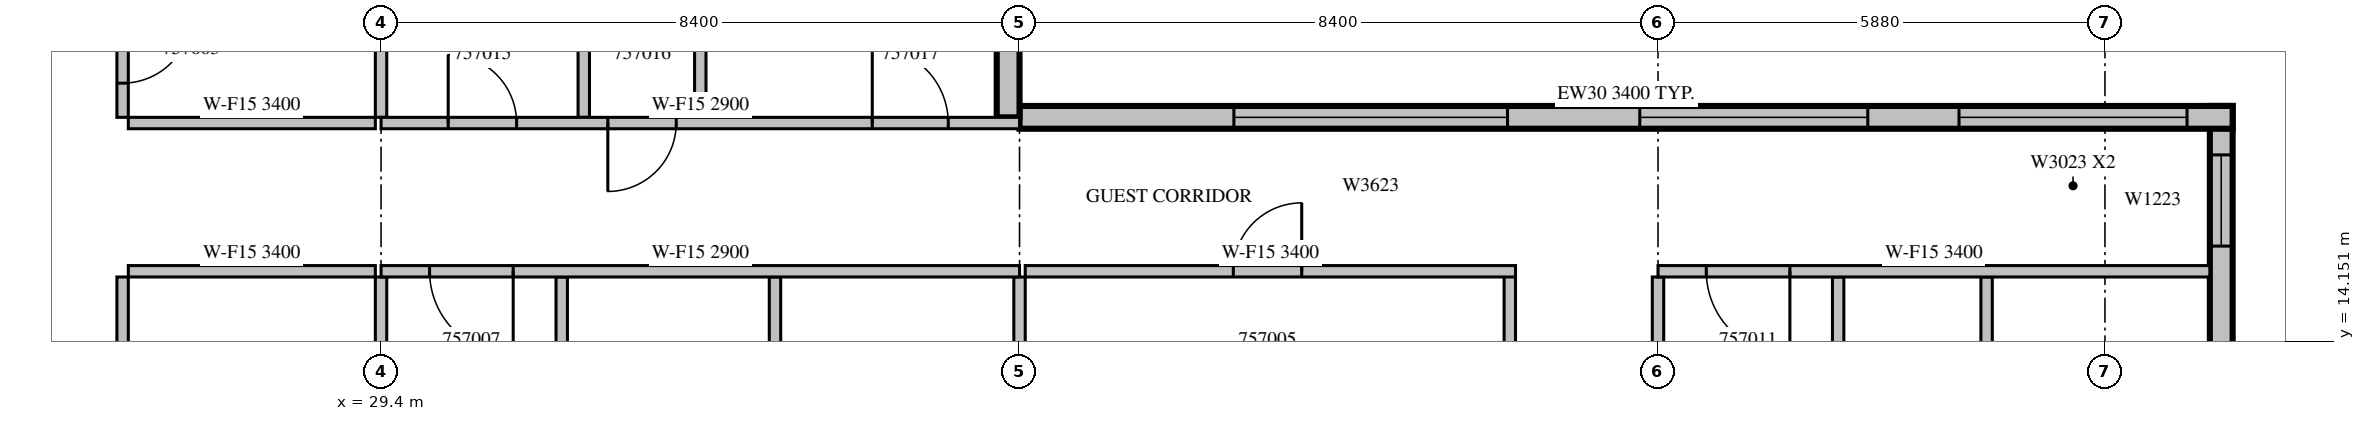
"""IFC4 building model, lengths in metres.
Left out: names, types, materials, properties, quantities, classifications, styles, units other than length and angle.
Written with IfcOpenShell. Run it as: python <this file> out.ifc"""

import sys

from ifc_helpers import new_model, si_unit, direction, frame, frame_2d, origin, place, context, subcontext, project, spatial, rectangle, extrude, source, transform, mapped, element, fill, save


model = new_model("IFC4")
c1 = context("Model", 3, precision=1e-05, world=origin(), true_north=direction((0.0, 1.0)))
c2 = subcontext(c1, "Body", "Model", "MODEL_VIEW")
j1 = project(units=[si_unit("LENGTHUNIT", "METRE"), si_unit("PLANEANGLEUNIT", "RADIAN")], contexts=[c1])
p1 = place(None, origin())
s1 = spatial("IfcSite", under=j1, at=p1, CompositionType="ELEMENT")
p2 = place(p1, origin())
s2 = spatial("IfcBuilding", under=s1, at=p2, CompositionType="ELEMENT")
p3 = place(p2, frame((0.0, 0.0, 250.0)))
s3 = spatial("IfcBuildingStorey", under=s2, at=p3, CompositionType="ELEMENT", Elevation=250.0)
m1 = source(origin(), c2, "Body", "SweptSolid", [
    extrude(rectangle(XDim=3.375, YDim=0.3, at=frame_2d((1.688, 0.0))), origin(), (0.0, 0.0, 1.0), 3.4),
])
p4 = place(p3, frame((53.61, 13.875, 0.0), z_axis=(0.0, 0.0, 1.0), x_axis=(0.0, 1.0, 0.0)))
e1 = element("IfcWall", 1, at=p4, inside=s3, PredefinedType="STANDARD", context=c2, shape_type="MappedRepresentation", body=[
    mapped(m1, transform((0.0, 0.0, 0.0), scale=1.0)),
])
m2 = source(origin(), c2, "Body", "SweptSolid", [
    extrude(rectangle(XDim=1.2, YDim=2.3, at=frame_2d((0.6, 1.15))), frame((0.0, 0.16, 0.0), z_axis=(0.0, -1.0, 0.0), x_axis=(1.0, 0.0, 0.0)), (0.0, 0.0, 1.0), 0.32),
])
p5 = place(p4, frame((1.531, 0.0, 0.6)))
e2 = element("IfcOpeningElement", 2, at=p5, cuts=e1, PredefinedType="OPENING", context=c2, shape_type="MappedRepresentation", body=[
    mapped(m2, transform((0.0, 0.0, 0.0), scale=1.0)),
])
m3 = source(origin(), c2, "Body", "SweptSolid", [
    extrude(rectangle(XDim=15.96, YDim=0.3, at=frame_2d((7.98, 0.0))), origin(), (0.0, 0.0, 1.0), 3.4),
])
p6 = place(p3, frame((53.76, 17.1, 0.0), z_axis=(0.0, 0.0, 1.0), x_axis=(-1.0, 0.0, 0.0)))
e3 = element("IfcWall", 3, at=p6, inside=s3, PredefinedType="STANDARD", context=c2, shape_type="MappedRepresentation", body=[
    mapped(m3, transform((0.0, 0.0, 0.0), scale=1.0)),
])
m4 = source(origin(), c2, "Body", "SweptSolid", [
    extrude(rectangle(XDim=3.0, YDim=2.3, at=frame_2d((1.5, 1.15))), frame((0.0, 0.16, 0.0), z_axis=(0.0, -1.0, 0.0), x_axis=(1.0, 0.0, 0.0)), (0.0, 0.0, 1.0), 0.32),
])
p7 = place(p6, frame((0.6, 0.0, 0.6)))
e4 = element("IfcOpeningElement", 4, at=p7, cuts=e3, PredefinedType="OPENING", context=c2, shape_type="MappedRepresentation", body=[
    mapped(m4, transform((0.0, 0.0, 0.0), scale=1.0)),
])
p8 = place(p6, frame((4.8, 0.0, 0.6)))
e5 = element("IfcOpeningElement", 5, at=p8, cuts=e3, PredefinedType="OPENING", context=c2, shape_type="MappedRepresentation", body=[
    mapped(m4, transform((0.0, 0.0, 0.0), scale=1.0)),
])
m5 = source(origin(), c2, "Body", "SweptSolid", [
    extrude(rectangle(XDim=3.6, YDim=2.3, at=frame_2d((1.8, 1.15))), frame((0.0, 0.16, 0.0), z_axis=(0.0, -1.0, 0.0), x_axis=(1.0, 0.0, 0.0)), (0.0, 0.0, 1.0), 0.32),
])
p9 = place(p6, frame((9.54, 0.0, 0.6)))
e6 = element("IfcOpeningElement", 6, at=p9, cuts=e3, PredefinedType="OPENING", context=c2, shape_type="MappedRepresentation", body=[
    mapped(m5, transform((0.0, 0.0, 0.0), scale=1.0)),
])
m6 = source(origin(), c2, "Body", "SweptSolid", [
    extrude(rectangle(XDim=3.1, YDim=0.3, at=frame_2d((1.55, 0.0))), origin(), (0.0, 0.0, 1.0), 3.4),
])
p10 = place(p3, frame((37.65, 17.1, 0.0), z_axis=(0.0, 0.0, 1.0), x_axis=(0.0, 1.0, 0.0)))
e7 = element("IfcWall", 7, at=p10, inside=s3, PredefinedType="STANDARD", context=c2, shape_type="MappedRepresentation", body=[
    mapped(m6, transform((0.0, 0.0, 0.0), scale=1.0)),
])
m7 = source(origin(), c2, "Body", "SweptSolid", [
    extrude(rectangle(XDim=1.8, YDim=2.3, at=frame_2d((0.9, 1.15))), frame((0.0, 0.16, 0.0), z_axis=(0.0, -1.0, 0.0), x_axis=(1.0, 0.0, 0.0)), (0.0, 0.0, 1.0), 0.32),
])
p11 = place(p10, frame((1.125, 0.0, 0.6)))
e8 = element("IfcOpeningElement", 8, at=p11, cuts=e7, PredefinedType="OPENING", context=c2, shape_type="MappedRepresentation", body=[
    mapped(m7, transform((0.0, 0.0, 0.0), scale=1.0)),
])
m8 = source(origin(), c2, "Body", "SweptSolid", [
    extrude(rectangle(XDim=11.525, YDim=0.15, at=frame_2d((5.763, 0.0))), origin(), (0.0, 0.0, 1.0), 2.4),
])
p12 = place(p3, frame((26.0, 15.0, 0.0), z_axis=(0.0, 0.0, 1.0), x_axis=(0.0, -1.0, 0.0)))
e9 = element("IfcWall", 9, at=p12, inside=s3, PredefinedType="PARTITIONING", context=c2, shape_type="MappedRepresentation", body=[
    mapped(m8, transform((0.0, 0.0, 0.0), scale=1.0)),
])
m9 = source(origin(), c2, "Body", "SweptSolid", [
    extrude(rectangle(XDim=0.9, YDim=2.1, at=frame_2d((0.45, 1.05))), frame((0.0, 0.085, 0.0), z_axis=(0.0, -1.0, 0.0), x_axis=(1.0, 0.0, 0.0)), (0.0, 0.0, 1.0), 0.17),
])
p13 = place(p12, frame((8.162, 0.0, 0.0)))
e10 = element("IfcOpeningElement", 10, at=p13, cuts=e9, PredefinedType="OPENING", context=c2, shape_type="MappedRepresentation", body=[
    mapped(m9, transform((0.0, 0.0, 0.0), scale=1.0)),
])
p14 = place(p12, frame((1.525, 0.0, 0.0)))
e11 = element("IfcOpeningElement", 11, at=p14, cuts=e9, PredefinedType="OPENING", context=c2, shape_type="MappedRepresentation", body=[
    mapped(m9, transform((0.0, 0.0, 0.0), scale=1.0)),
])
m10 = source(origin(), c2, "Body", "SweptSolid", [
    extrude(rectangle(XDim=3.6, YDim=0.15, at=frame_2d((1.8, 0.0))), origin(), (0.0, 0.0, 1.0), 3.4),
])
p15 = place(p3, frame((26.0, 20.7, 0.0), z_axis=(0.0, 0.0, 1.0), x_axis=(0.0, -1.0, 0.0)))
e12 = element("IfcWall", 12, at=p15, inside=s3, PredefinedType="PARTITIONING", context=c2, shape_type="MappedRepresentation", body=[
    mapped(m10, transform((0.0, 0.0, 0.0), scale=1.0)),
])
p16 = place(p15, frame((2.25, 0.0, 0.0)))
e13 = element("IfcOpeningElement", 13, at=p16, cuts=e12, PredefinedType="OPENING", context=c2, shape_type="MappedRepresentation", body=[
    mapped(m9, transform((0.0, 0.0, 0.0), scale=1.0)),
])
m11 = source(origin(), c2, "Body", "SweptSolid", [
    extrude(rectangle(XDim=3.25, YDim=0.15, at=frame_2d((1.625, 0.0))), origin(), (0.0, 0.0, 1.0), 3.4),
])
for number, where, z_axis, x_axis in (
    (14, (29.325, 15.075, 0.0), (0.0, 0.0, 1.0), (-1.0, 0.0, 0.0)),
    (15, (26.075, 17.025, 0.0), (0.0, 0.0, 1.0), (1.0, 0.0, 0.0)),
):
    element("IfcWall", number, at=place(p3, frame(where, z_axis=z_axis, x_axis=x_axis)), inside=s3, PredefinedType="PARTITIONING", context=c2, shape_type="MappedRepresentation", body=[
        mapped(m11, transform((0.0, 0.0, 0.0), scale=1.0)),
    ])
m12 = source(origin(), c2, "Body", "SweptSolid", [
    extrude(rectangle(XDim=4.101, YDim=0.15, at=frame_2d((2.05, 0.0))), origin(), (0.0, 0.0, 1.0), 3.4),
])
p17 = place(p3, frame((29.4, 10.899, 0.0), z_axis=(0.0, 0.0, 1.0), x_axis=(0.0, 1.0, 0.0)))
e16 = element("IfcWall", 16, at=p17, inside=s3, PredefinedType="PARTITIONING", context=c2, shape_type="MappedRepresentation", body=[
    mapped(m12, transform((0.0, 0.0, 0.0), scale=1.0)),
])
m13 = source(origin(), c2, "Body", "SweptSolid", [
    extrude(rectangle(XDim=3.101, YDim=0.15, at=frame_2d((1.55, 0.0))), origin(), (0.0, 0.0, 1.0), 3.4),
])
p18 = place(p3, frame((29.4, 17.1, 0.0), z_axis=(0.0, 0.0, 1.0), x_axis=(0.0, 1.0, 0.0)))
e17 = element("IfcWall", 17, at=p18, inside=s3, PredefinedType="PARTITIONING", context=c2, shape_type="MappedRepresentation", body=[
    mapped(m13, transform((0.0, 0.0, 0.0), scale=1.0)),
])
m14 = source(origin(), c2, "Body", "SweptSolid", [
    extrude(rectangle(XDim=3.575, YDim=0.15, at=frame_2d((1.788, 0.0))), origin(), (0.0, 0.0, 1.0), 3.4),
])
p19 = place(p3, frame((44.25, 11.5, 0.0), z_axis=(0.0, 0.0, 1.0), x_axis=(0.0, 1.0, 0.0)))
e18 = element("IfcWall", 18, at=p19, inside=s3, PredefinedType="PARTITIONING", context=c2, shape_type="MappedRepresentation", body=[
    mapped(m14, transform((0.0, 0.0, 0.0), scale=1.0)),
])
m15 = source(origin(), c2, "Body", "SweptSolid", [
    extrude(rectangle(XDim=6.45, YDim=0.15, at=frame_2d((3.225, 0.0))), origin(), (0.0, 0.0, 1.0), 3.4),
])
p20 = place(p3, frame((44.325, 15.075, 0.0), z_axis=(0.0, 0.0, 1.0), x_axis=(-1.0, 0.0, 0.0)))
e19 = element("IfcWall", 19, at=p20, inside=s3, PredefinedType="PARTITIONING", context=c2, shape_type="MappedRepresentation", body=[
    mapped(m15, transform((0.0, 0.0, 0.0), scale=1.0)),
])
p21 = place(p20, frame((2.812, 0.0, 0.0)))
e20 = element("IfcOpeningElement", 20, at=p21, cuts=e19, PredefinedType="OPENING", context=c2, shape_type="MappedRepresentation", body=[
    mapped(m9, transform((0.0, 0.0, 0.0), scale=1.0)),
])
m16 = source(origin(), c2, "Body", "SweptSolid", [
    extrude(rectangle(XDim=3.95, YDim=0.15, at=frame_2d((1.975, 0.0))), origin(), (0.0, 0.0, 1.0), 3.4),
])
for number, where, z_axis, x_axis in (
    (21, (31.777, 11.05, 0.0), (0.0, 0.0, 1.0), (0.0, 1.0, 0.0)),
    (22, (34.583, 11.05, 0.0), (0.0, 0.0, 1.0), (0.0, 1.0, 0.0)),
    (23, (37.8, 11.05, 0.0), (0.0, 0.0, 1.0), (0.0, 1.0, 0.0)),
    (24, (48.57, 11.05, 0.0), (0.0, 0.0, 1.0), (0.0, 1.0, 0.0)),
    (25, (50.523, 11.05, 0.0), (0.0, 0.0, 1.0), (0.0, 1.0, 0.0)),
    (26, (46.2, 11.05, 0.0), (0.0, 0.0, 1.0), (0.0, 1.0, 0.0)),
):
    element("IfcWall", number, at=place(p3, frame(where, z_axis=z_axis, x_axis=x_axis)), inside=s3, PredefinedType="PARTITIONING", context=c2, shape_type="MappedRepresentation", body=[
        mapped(m16, transform((0.0, 0.0, 0.0), scale=1.0)),
    ])
m17 = source(origin(), c2, "Body", "SweptSolid", [
    extrude(rectangle(XDim=3.6, YDim=0.15, at=frame_2d((1.8, 0.0))), origin(), (0.0, 0.0, 1.0), 2.4),
])
for number, where, z_axis, x_axis in (
    (27, (32.067, 20.7, 0.0), (0.0, 0.0, 1.0), (0.0, -1.0, 0.0)),
    (28, (33.6, 17.1, 0.0), (0.0, 0.0, 1.0), (0.0, 1.0, 0.0)),
):
    element("IfcWall", number, at=place(p3, frame(where, z_axis=z_axis, x_axis=x_axis)), inside=s3, PredefinedType="PARTITIONING", context=c2, shape_type="MappedRepresentation", body=[
        mapped(m17, transform((0.0, 0.0, 0.0), scale=1.0)),
    ])
m18 = source(origin(), c2, "Body", "SweptSolid", [
    extrude(rectangle(XDim=8.4, YDim=0.15, at=frame_2d((4.2, 0.0))), origin(), (0.0, 0.0, 1.0), 2.9),
])
p22 = place(p3, frame((37.8, 15.075, 0.0), z_axis=(0.0, 0.0, 1.0), x_axis=(-1.0, 0.0, 0.0)))
e29 = element("IfcWall", 29, at=p22, inside=s3, PredefinedType="PARTITIONING", context=c2, shape_type="MappedRepresentation", body=[
    mapped(m18, transform((0.0, 0.0, 0.0), scale=1.0)),
])
m19 = source(origin(), c2, "Body", "SweptSolid", [
    extrude(rectangle(XDim=1.1, YDim=2.1, at=frame_2d((0.55, 1.05))), frame((0.0, 0.085, 0.0), z_axis=(0.0, -1.0, 0.0), x_axis=(1.0, 0.0, 0.0)), (0.0, 0.0, 1.0), 0.17),
])
p23 = place(p22, frame((6.662, 0.0, 0.0)))
e30 = element("IfcOpeningElement", 30, at=p23, cuts=e29, PredefinedType="OPENING", context=c2, shape_type="MappedRepresentation", body=[
    mapped(m19, transform((0.0, 0.0, 0.0), scale=1.0)),
])
m20 = source(origin(), c2, "Body", "SweptSolid", [
    extrude(rectangle(XDim=7.26, YDim=0.15, at=frame_2d((3.63, 0.0))), origin(), (0.0, 0.0, 1.0), 3.4),
])
p24 = place(p3, frame((53.46, 15.075, 0.0), z_axis=(0.0, 0.0, 1.0), x_axis=(-1.0, 0.0, 0.0)))
e31 = element("IfcWall", 31, at=p24, inside=s3, PredefinedType="PARTITIONING", context=c2, shape_type="MappedRepresentation", body=[
    mapped(m20, transform((0.0, 0.0, 0.0), scale=1.0)),
])
p25 = place(p24, frame((5.525, 0.0, 0.0)))
e32 = element("IfcOpeningElement", 32, at=p25, cuts=e31, PredefinedType="OPENING", context=c2, shape_type="MappedRepresentation", body=[
    mapped(m19, transform((0.0, 0.0, 0.0), scale=1.0)),
])
p26 = place(p3, frame((29.4, 17.025, 0.0), z_axis=(0.0, 0.0, 1.0), x_axis=(1.0, 0.0, 0.0)))
e33 = element("IfcWall", 33, at=p26, inside=s3, PredefinedType="PARTITIONING", context=c2, shape_type="MappedRepresentation", body=[
    mapped(m18, transform((0.0, 0.0, 0.0), scale=1.0)),
])
p27 = place(p26, frame((0.883, 0.0, 0.0)))
e34 = element("IfcOpeningElement", 34, at=p27, cuts=e33, PredefinedType="OPENING", context=c2, shape_type="MappedRepresentation", body=[
    mapped(m9, transform((0.0, 0.0, 0.0), scale=1.0)),
])
p28 = place(p26, frame((2.983, 0.0, 0.0)))
e35 = element("IfcOpeningElement", 35, at=p28, cuts=e33, PredefinedType="OPENING", context=c2, shape_type="MappedRepresentation", body=[
    mapped(m9, transform((0.0, 0.0, 0.0), scale=1.0)),
])
m21 = source(origin(), c2, "Body", "SweptSolid", [
    extrude(rectangle(XDim=1.0, YDim=2.1, at=frame_2d((0.5, 1.05))), frame((0.0, 0.085, 0.0), z_axis=(0.0, -1.0, 0.0), x_axis=(1.0, 0.0, 0.0)), (0.0, 0.0, 1.0), 0.17),
])
p29 = place(p26, frame((6.463, 0.0, 0.0)))
e36 = element("IfcOpeningElement", 36, at=p29, cuts=e33, PredefinedType="OPENING", context=c2, shape_type="MappedRepresentation", body=[
    mapped(m21, transform((0.0, 0.0, 0.0), scale=1.0)),
])
m22 = source(origin(), c2, "Body", "SweptSolid", [
    extrude(rectangle(XDim=1.2, YDim=2.3, at=frame_2d((0.6, 1.15))), frame((0.0, 0.03, 0.0), z_axis=(0.0, -1.0, 0.0), x_axis=(1.0, 0.0, 0.0)), (0.0, 0.0, 1.0), 0.06),
])
p30 = place(p5, origin())
e37 = element("IfcWindow", 37, at=p30, inside=s3, PartitioningType="SINGLE_PANEL", PredefinedType="WINDOW", context=c2, shape_type="MappedRepresentation", body=[
    mapped(m22, transform((0.0, 0.0, 0.0), scale=1.0)),
])
fill(e2, e37)
m23 = source(origin(), c2, "Body", "SweptSolid", [
    extrude(rectangle(XDim=3.0, YDim=2.3, at=frame_2d((1.5, 1.15))), frame((0.0, 0.03, 0.0), z_axis=(0.0, -1.0, 0.0), x_axis=(1.0, 0.0, 0.0)), (0.0, 0.0, 1.0), 0.06),
])
p31 = place(p7, origin())
e38 = element("IfcWindow", 38, at=p31, inside=s3, PartitioningType="SINGLE_PANEL", PredefinedType="WINDOW", context=c2, shape_type="MappedRepresentation", body=[
    mapped(m23, transform((0.0, 0.0, 0.0), scale=1.0)),
])
fill(e4, e38)
p32 = place(p8, origin())
e39 = element("IfcWindow", 39, at=p32, inside=s3, PartitioningType="SINGLE_PANEL", PredefinedType="WINDOW", context=c2, shape_type="MappedRepresentation", body=[
    mapped(m23, transform((0.0, 0.0, 0.0), scale=1.0)),
])
fill(e5, e39)
m24 = source(origin(), c2, "Body", "SweptSolid", [
    extrude(rectangle(XDim=3.6, YDim=2.3, at=frame_2d((1.8, 1.15))), frame((0.0, 0.03, 0.0), z_axis=(0.0, -1.0, 0.0), x_axis=(1.0, 0.0, 0.0)), (0.0, 0.0, 1.0), 0.06),
])
p33 = place(p9, origin())
e40 = element("IfcWindow", 40, at=p33, inside=s3, PartitioningType="SINGLE_PANEL", PredefinedType="WINDOW", context=c2, shape_type="MappedRepresentation", body=[
    mapped(m24, transform((0.0, 0.0, 0.0), scale=1.0)),
])
fill(e6, e40)
m25 = source(origin(), c2, "Body", "SweptSolid", [
    extrude(rectangle(XDim=0.9, YDim=2.1, at=frame_2d((0.45, 1.05))), frame((0.0, 0.025, 0.0), z_axis=(0.0, -1.0, 0.0), x_axis=(1.0, 0.0, 0.0)), (0.0, 0.0, 1.0), 0.05),
])
p34 = place(p16, origin())
e41 = element("IfcDoor", 41, at=p34, inside=s3, OperationType="SINGLE_SWING_LEFT", PredefinedType="DOOR", context=c2, shape_type="MappedRepresentation", body=[
    mapped(m25, transform((0.0, 0.0, 0.0), scale=1.0)),
])
fill(e13, e41)
p35 = place(p21, origin())
e42 = element("IfcDoor", 42, at=p35, inside=s3, OperationType="SINGLE_SWING_RIGHT", PredefinedType="DOOR", context=c2, shape_type="MappedRepresentation", body=[
    mapped(m25, transform((0.0, 0.0, 0.0), scale=1.0)),
])
fill(e20, e42)
m26 = source(origin(), c2, "Body", "SweptSolid", [
    extrude(rectangle(XDim=1.1, YDim=2.1, at=frame_2d((0.55, 1.05))), frame((0.0, 0.025, 0.0), z_axis=(0.0, -1.0, 0.0), x_axis=(1.0, 0.0, 0.0)), (0.0, 0.0, 1.0), 0.05),
])
p36 = place(p23, origin())
e43 = element("IfcDoor", 43, at=p36, inside=s3, OperationType="SINGLE_SWING_LEFT", PredefinedType="DOOR", context=c2, shape_type="MappedRepresentation", body=[
    mapped(m26, transform((0.0, 0.0, 0.0), scale=1.0)),
])
fill(e30, e43)
p37 = place(p25, origin())
e44 = element("IfcDoor", 44, at=p37, inside=s3, OperationType="SINGLE_SWING_LEFT", PredefinedType="DOOR", context=c2, shape_type="MappedRepresentation", body=[
    mapped(m26, transform((0.0, 0.0, 0.0), scale=1.0)),
])
fill(e32, e44)
p38 = place(p27, origin())
e45 = element("IfcDoor", 45, at=p38, inside=s3, OperationType="SINGLE_SWING_LEFT", PredefinedType="DOOR", context=c2, shape_type="MappedRepresentation", body=[
    mapped(m25, transform((0.0, 0.0, 0.0), scale=1.0)),
])
fill(e34, e45)
p39 = place(p28, origin())
e46 = element("IfcDoor", 46, at=p39, inside=s3, OperationType="SINGLE_SWING_RIGHT", PredefinedType="DOOR", context=c2, shape_type="MappedRepresentation", body=[
    mapped(m25, transform((0.0, 0.0, 0.0), scale=1.0)),
])
fill(e35, e46)
m27 = source(origin(), c2, "Body", "SweptSolid", [
    extrude(rectangle(XDim=1.0, YDim=2.1, at=frame_2d((0.5, 1.05))), frame((0.0, 0.025, 0.0), z_axis=(0.0, -1.0, 0.0), x_axis=(1.0, 0.0, 0.0)), (0.0, 0.0, 1.0), 0.05),
])
p40 = place(p29, origin())
e47 = element("IfcDoor", 47, at=p40, inside=s3, OperationType="SINGLE_SWING_LEFT", PredefinedType="DOOR", context=c2, shape_type="MappedRepresentation", body=[
    mapped(m27, transform((0.0, 0.0, 0.0), scale=1.0)),
])
fill(e36, e47)
save(model, sys.argv[1])
